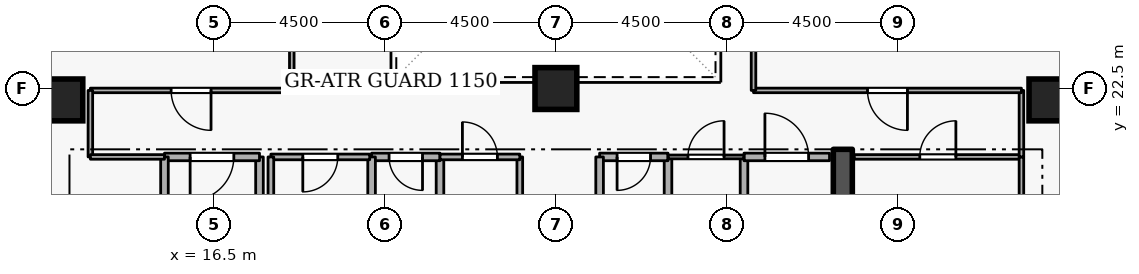
"""IFC4 building model, lengths in metres.
Left out: names, types, materials, properties, quantities, classifications, styles, units other than length and angle.
Written with IfcOpenShell. Run it as: python <this file> out.ifc"""

import sys

from ifc_helpers import new_model, si_unit, direction, frame, frame_2d, origin, origin_2d, place, context, subcontext, project, spatial, rectangle, extrude, element, fill, save


model = new_model("IFC4")
c1 = context("Model", 3, precision=1e-05, world=origin(), true_north=direction((0.0, 1.0)))
c2 = subcontext(c1, "Body", "Model", "MODEL_VIEW")
j1 = project(units=[si_unit("LENGTHUNIT", "METRE"), si_unit("PLANEANGLEUNIT", "RADIAN")], contexts=[c1])
p1 = place(None, origin())
s1 = spatial("IfcSite", under=j1, at=p1, CompositionType="ELEMENT")
p2 = place(p1, origin())
s2 = spatial("IfcBuilding", under=s1, at=p2, CompositionType="ELEMENT")
p3 = place(p2, frame((0.0, 0.0, 149.1)))
s3 = spatial("IfcBuildingStorey", under=s2, at=p3, CompositionType="ELEMENT", Elevation=149.1)
p4 = place(p3, frame((33.05, 15.1, 0.0), z_axis=(0.0, 0.0, 1.0), x_axis=(0.0, 1.0, 0.0)))
e1 = element("IfcWall", 1, at=p4, inside=s3, PredefinedType="SHEAR", context=c2, shape_type="SweptSolid", body=[
    extrude(rectangle(XDim=5.8, YDim=0.5, at=frame_2d((2.9, 0.0))), origin(), (0.0, 0.0, 1.0), 3.6),
])
for number, where, z_axis, x_axis in (
    (2, (12.5, 22.2, 0.0), (0.0, 0.0, 1.0), (1.0, 0.0, 0.0)),
    (3, (38.5, 22.2, 0.0), (0.0, 0.0, 1.0), (1.0, 0.0, 0.0)),
    (4, (25.5, 22.5, 0.0), (0.0, 0.0, 1.0), (1.0, 0.0, 0.0)),
):
    element("IfcColumn", number, at=place(p3, frame(where, z_axis=z_axis, x_axis=x_axis)), inside=s3, PredefinedType="COLUMN", context=c2, shape_type="SweptSolid", body=[
        extrude(rectangle(XDim=1.1, YDim=1.1, at=origin_2d()), origin(), (0.0, 0.0, 1.0), 3.6),
    ])
p5 = place(p3, frame((17.7, 18.4, 0.0), z_axis=(0.0, 0.0, 1.0), x_axis=(0.0, 1.0, 0.0)))
e5 = element("IfcWall", 5, at=p5, inside=s3, PredefinedType="STANDARD", context=c2, shape_type="SweptSolid", body=[
    extrude(rectangle(XDim=2.3, YDim=0.2, at=frame_2d((1.15, 0.0))), origin(), (0.0, 0.0, 1.0), 2.505),
])
p6 = place(p3, frame((17.7, 20.7, 0.0), z_axis=(0.0, 0.0, 1.0), x_axis=(-1.0, 0.0, 0.0)))
e6 = element("IfcWall", 6, at=p6, inside=s3, PredefinedType="STANDARD", context=c2, shape_type="SweptSolid", body=[
    extrude(rectangle(XDim=2.5, YDim=0.2, at=frame_2d((1.25, 0.0))), origin(), (0.0, 0.0, 1.0), 3.3),
])
p7 = place(p6, frame((0.675, 0.0, 0.0)))
e7 = element("IfcOpeningElement", 7, at=p7, cuts=e6, PredefinedType="OPENING", context=c2, shape_type="SweptSolid", body=[
    extrude(rectangle(XDim=1.15, YDim=2.1, at=frame_2d((0.575, 1.05))), frame((0.0, 0.11, 0.0), z_axis=(0.0, -1.0, 0.0), x_axis=(1.0, 0.0, 0.0)), (0.0, 0.0, 1.0), 0.22),
])
p8 = place(p3, frame((15.2, 20.7, 0.0), z_axis=(0.0, 0.0, 1.0), x_axis=(0.0, -1.0, 0.0)))
e8 = element("IfcWall", 8, at=p8, inside=s3, PredefinedType="STANDARD", context=c2, shape_type="SweptSolid", body=[
    extrude(rectangle(XDim=5.7, YDim=0.2, at=frame_2d((2.85, 0.0))), origin(), (0.0, 0.0, 1.0), 3.3),
])
p9 = place(p3, frame((28.45, 18.65, 0.0), z_axis=(0.0, 0.0, 1.0), x_axis=(0.0, 1.0, 0.0)))
e9 = element("IfcWall", 9, at=p9, inside=s3, PredefinedType="STANDARD", context=c2, shape_type="SweptSolid", body=[
    extrude(rectangle(XDim=2.05, YDim=0.2, at=frame_2d((1.025, 0.0))), origin(), (0.0, 0.0, 1.0), 3.3),
])
p10 = place(p3, frame((28.45, 20.7, 0.0), z_axis=(0.0, 0.0, 1.0), x_axis=(-1.0, 0.0, 0.0)))
e10 = element("IfcWall", 10, at=p10, inside=s3, PredefinedType="STANDARD", context=c2, shape_type="SweptSolid", body=[
    extrude(rectangle(XDim=1.8, YDim=0.2, at=frame_2d((0.9, 0.0))), origin(), (0.0, 0.0, 1.0), 3.3),
])
p11 = place(p10, frame((0.46, 0.0, 0.0)))
e11 = element("IfcOpeningElement", 11, at=p11, cuts=e10, PredefinedType="OPENING", context=c2, shape_type="SweptSolid", body=[
    extrude(rectangle(XDim=0.88, YDim=2.04, at=frame_2d((0.44, 1.02))), frame((0.0, 0.11, 0.0), z_axis=(0.0, -1.0, 0.0), x_axis=(1.0, 0.0, 0.0)), (0.0, 0.0, 1.0), 0.22),
])
for number, where, z_axis, x_axis in (
    (12, (26.65, 20.7, 0.0), (0.0, 0.0, 1.0), (0.0, -1.0, 0.0)),
    (13, (22.45, 18.65, 0.0), (0.0, 0.0, 1.0), (0.0, 1.0, 0.0)),
):
    element("IfcWall", number, at=place(p3, frame(where, z_axis=z_axis, x_axis=x_axis)), inside=s3, PredefinedType="STANDARD", context=c2, shape_type="SweptSolid", body=[
        extrude(rectangle(XDim=2.05, YDim=0.2, at=frame_2d((1.025, 0.0))), origin(), (0.0, 0.0, 1.0), 3.3),
    ])
p12 = place(p3, frame((22.45, 20.7, 0.0), z_axis=(0.0, 0.0, 1.0), x_axis=(-1.0, 0.0, 0.0)))
e14 = element("IfcWall", 14, at=p12, inside=s3, PredefinedType="STANDARD", context=c2, shape_type="SweptSolid", body=[
    extrude(rectangle(XDim=1.8, YDim=0.2, at=frame_2d((0.9, 0.0))), origin(), (0.0, 0.0, 1.0), 3.3),
])
p13 = place(p12, frame((0.46, 0.0, 0.0)))
e15 = element("IfcOpeningElement", 15, at=p13, cuts=e14, PredefinedType="OPENING", context=c2, shape_type="SweptSolid", body=[
    extrude(rectangle(XDim=0.88, YDim=2.04, at=frame_2d((0.44, 1.02))), frame((0.0, 0.11, 0.0), z_axis=(0.0, -1.0, 0.0), x_axis=(1.0, 0.0, 0.0)), (0.0, 0.0, 1.0), 0.22),
])
for number, where, z_axis, x_axis in (
    (16, (20.65, 20.7, 0.0), (0.0, 0.0, 1.0), (0.0, -1.0, 0.0)),
    (17, (30.45, 18.65, 0.0), (0.0, 0.0, 1.0), (0.0, 1.0, 0.0)),
):
    element("IfcWall", number, at=place(p3, frame(where, z_axis=z_axis, x_axis=x_axis)), inside=s3, PredefinedType="STANDARD", context=c2, shape_type="SweptSolid", body=[
        extrude(rectangle(XDim=2.05, YDim=0.2, at=frame_2d((1.025, 0.0))), origin(), (0.0, 0.0, 1.0), 3.3),
    ])
p14 = place(p3, frame((30.45, 20.7, 0.0), z_axis=(0.0, 0.0, 1.0), x_axis=(1.0, 0.0, 0.0)))
e18 = element("IfcWall", 18, at=p14, inside=s3, PredefinedType="STANDARD", context=c2, shape_type="SweptSolid", body=[
    extrude(rectangle(XDim=2.25, YDim=0.2, at=frame_2d((1.125, 0.0))), origin(), (0.0, 0.0, 1.0), 3.3),
])
p15 = place(p14, frame((0.55, 0.0, 0.0)))
e19 = element("IfcOpeningElement", 19, at=p15, cuts=e18, PredefinedType="OPENING", context=c2, shape_type="SweptSolid", body=[
    extrude(rectangle(XDim=1.15, YDim=2.1, at=frame_2d((0.575, 1.05))), frame((0.0, 0.11, 0.0), z_axis=(0.0, -1.0, 0.0), x_axis=(1.0, 0.0, 0.0)), (0.0, 0.0, 1.0), 0.22),
])
p16 = place(p3, frame((20.6, 20.7, 0.0), z_axis=(0.0, 0.0, 1.0), x_axis=(-1.0, 0.0, 0.0)))
e20 = element("IfcWall", 20, at=p16, inside=s3, PredefinedType="PARTITIONING", context=c2, shape_type="SweptSolid", body=[
    extrude(rectangle(XDim=2.6, YDim=0.15, at=frame_2d((1.3, 0.0))), origin(), (0.0, 0.0, 1.0), 3.3),
])
p17 = place(p16, frame((0.84, 0.0, 0.0)))
e21 = element("IfcOpeningElement", 21, at=p17, cuts=e20, PredefinedType="OPENING", context=c2, shape_type="SweptSolid", body=[
    extrude(rectangle(XDim=0.92, YDim=2.08, at=frame_2d((0.46, 1.04))), frame((0.0, 0.085, 0.0), z_axis=(0.0, -1.0, 0.0), x_axis=(1.0, 0.0, 0.0)), (0.0, 0.0, 1.0), 0.17),
])
p18 = place(p3, frame((18.0, 20.7, 0.0), z_axis=(0.0, 0.0, 1.0), x_axis=(0.0, -1.0, 0.0)))
e22 = element("IfcWall", 22, at=p18, inside=s3, PredefinedType="PARTITIONING", context=c2, shape_type="SweptSolid", body=[
    extrude(rectangle(XDim=2.05, YDim=0.15, at=frame_2d((1.025, 0.0))), origin(), (0.0, 0.0, 1.0), 2.505),
])
p19 = place(p3, frame((24.55, 20.7, 0.0), z_axis=(0.0, 0.0, 1.0), x_axis=(0.0, -1.0, 0.0)))
e23 = element("IfcWall", 23, at=p19, inside=s3, PredefinedType="PARTITIONING", context=c2, shape_type="SweptSolid", body=[
    extrude(rectangle(XDim=2.05, YDim=0.15, at=frame_2d((1.025, 0.0))), origin(), (0.0, 0.0, 1.0), 3.3),
])
p20 = place(p3, frame((22.45, 20.7, 0.0), z_axis=(0.0, 0.0, 1.0), x_axis=(1.0, 0.0, 0.0)))
e24 = element("IfcWall", 24, at=p20, inside=s3, PredefinedType="PARTITIONING", context=c2, shape_type="SweptSolid", body=[
    extrude(rectangle(XDim=2.1, YDim=0.15, at=frame_2d((1.05, 0.0))), origin(), (0.0, 0.0, 1.0), 3.3),
])
p21 = place(p20, frame((0.59, 0.0, 0.0)))
e25 = element("IfcOpeningElement", 25, at=p21, cuts=e24, PredefinedType="OPENING", context=c2, shape_type="SweptSolid", body=[
    extrude(rectangle(XDim=0.92, YDim=2.08, at=frame_2d((0.46, 1.04))), frame((0.0, 0.085, 0.0), z_axis=(0.0, -1.0, 0.0), x_axis=(1.0, 0.0, 0.0)), (0.0, 0.0, 1.0), 0.17),
])
p22 = place(p3, frame((28.45, 20.7, 0.0), z_axis=(0.0, 0.0, 1.0), x_axis=(1.0, 0.0, 0.0)))
e26 = element("IfcWall", 26, at=p22, inside=s3, PredefinedType="PARTITIONING", context=c2, shape_type="SweptSolid", body=[
    extrude(rectangle(XDim=2.0, YDim=0.1, at=frame_2d((1.0, 0.0))), origin(), (0.0, 0.0, 1.0), 3.3),
])
p23 = place(p22, frame((0.525, 0.0, 0.0)))
e27 = element("IfcOpeningElement", 27, at=p23, cuts=e26, PredefinedType="OPENING", context=c2, shape_type="SweptSolid", body=[
    extrude(rectangle(XDim=0.95, YDim=2.1, at=frame_2d((0.475, 1.05))), frame((0.0, 0.06, 0.0), z_axis=(0.0, -1.0, 0.0), x_axis=(1.0, 0.0, 0.0)), (0.0, 0.0, 1.0), 0.12),
])
p24 = place(p3, frame((33.35, 20.7, 0.0), z_axis=(0.0, 0.0, 1.0), x_axis=(1.0, 0.0, 0.0)))
e28 = element("IfcWall", 28, at=p24, inside=s3, PredefinedType="PARTITIONING", context=c2, shape_type="SweptSolid", body=[
    extrude(rectangle(XDim=4.4, YDim=0.12, at=frame_2d((2.2, 0.0))), origin(), (0.0, 0.0, 1.0), 3.3),
])
p25 = place(p24, frame((1.725, 0.0, 0.0)))
e29 = element("IfcOpeningElement", 29, at=p25, cuts=e28, PredefinedType="OPENING", context=c2, shape_type="SweptSolid", body=[
    extrude(rectangle(XDim=0.95, YDim=2.1, at=frame_2d((0.475, 1.05))), frame((0.0, 0.07, 0.0), z_axis=(0.0, -1.0, 0.0), x_axis=(1.0, 0.0, 0.0)), (0.0, 0.0, 1.0), 0.14),
])
p26 = place(p3, frame((37.75, 20.7, 0.0), z_axis=(0.0, 0.0, 1.0), x_axis=(0.0, -1.0, 0.0)))
e30 = element("IfcWall", 30, at=p26, inside=s3, PredefinedType="PARTITIONING", context=c2, shape_type="SweptSolid", body=[
    extrude(rectangle(XDim=5.65, YDim=0.12, at=frame_2d((2.825, 0.0))), origin(), (0.0, 0.0, 1.0), 3.3),
])
p27 = place(p3, frame((18.55, 27.0, 0.0), z_axis=(0.0, 0.0, 1.0), x_axis=(0.0, -1.0, 0.0)))
e31 = element("IfcWall", 31, at=p27, inside=s3, PredefinedType="PARTITIONING", context=c2, shape_type="SweptSolid", body=[
    extrude(rectangle(XDim=4.55, YDim=0.12, at=frame_2d((2.275, 0.0))), origin(), (0.0, 0.0, 1.0), 3.3),
])
p28 = place(p3, frame((18.55, 22.45, 0.0), z_axis=(0.0, 0.0, 1.0), x_axis=(-1.0, 0.0, 0.0)))
e32 = element("IfcWall", 32, at=p28, inside=s3, PredefinedType="PARTITIONING", context=c2, shape_type="SweptSolid", body=[
    extrude(rectangle(XDim=5.3, YDim=0.12, at=frame_2d((2.65, 0.0))), origin(), (0.0, 0.0, 1.0), 3.3),
])
p29 = place(p28, frame((2.125, 0.0, 0.0)))
e33 = element("IfcOpeningElement", 33, at=p29, cuts=e32, PredefinedType="OPENING", context=c2, shape_type="SweptSolid", body=[
    extrude(rectangle(XDim=1.05, YDim=2.1, at=frame_2d((0.525, 1.05))), frame((0.0, 0.07, 0.0), z_axis=(0.0, -1.0, 0.0), x_axis=(1.0, 0.0, 0.0)), (0.0, 0.0, 1.0), 0.14),
])
p30 = place(p3, frame((13.25, 22.45, 0.0), z_axis=(0.0, 0.0, 1.0), x_axis=(0.0, -1.0, 0.0)))
e34 = element("IfcWall", 34, at=p30, inside=s3, PredefinedType="PARTITIONING", context=c2, shape_type="SweptSolid", body=[
    extrude(rectangle(XDim=1.75, YDim=0.12, at=frame_2d((0.875, 0.0))), origin(), (0.0, 0.0, 1.0), 3.3),
])
p31 = place(p3, frame((13.25, 20.7, 0.0), z_axis=(0.0, 0.0, 1.0), x_axis=(1.0, 0.0, 0.0)))
e35 = element("IfcWall", 35, at=p31, inside=s3, PredefinedType="PARTITIONING", context=c2, shape_type="SweptSolid", body=[
    extrude(rectangle(XDim=1.95, YDim=0.12, at=frame_2d((0.975, 0.0))), origin(), (0.0, 0.0, 1.0), 3.3),
])
p32 = place(p3, frame((37.75, 20.7, 0.0), z_axis=(0.0, 0.0, 1.0), x_axis=(0.0, 1.0, 0.0)))
e36 = element("IfcWall", 36, at=p32, inside=s3, PredefinedType="PARTITIONING", context=c2, shape_type="SweptSolid", body=[
    extrude(rectangle(XDim=1.75, YDim=0.12, at=frame_2d((0.875, 0.0))), origin(), (0.0, 0.0, 1.0), 3.3),
])
p33 = place(p3, frame((37.75, 22.45, 0.0), z_axis=(0.0, 0.0, 1.0), x_axis=(-1.0, 0.0, 0.0)))
e37 = element("IfcWall", 37, at=p33, inside=s3, PredefinedType="PARTITIONING", context=c2, shape_type="SweptSolid", body=[
    extrude(rectangle(XDim=7.05, YDim=0.12, at=frame_2d((3.525, 0.0))), origin(), (0.0, 0.0, 1.0), 3.3),
])
p34 = place(p33, frame((3.0, 0.0, 0.0)))
e38 = element("IfcOpeningElement", 38, at=p34, cuts=e37, PredefinedType="OPENING", context=c2, shape_type="SweptSolid", body=[
    extrude(rectangle(XDim=1.05, YDim=2.1, at=frame_2d((0.525, 1.05))), frame((0.0, 0.07, 0.0), z_axis=(0.0, -1.0, 0.0), x_axis=(1.0, 0.0, 0.0)), (0.0, 0.0, 1.0), 0.14),
])
p35 = place(p3, frame((30.7, 22.45, 0.0), z_axis=(0.0, 0.0, 1.0), x_axis=(0.0, 1.0, 0.0)))
e39 = element("IfcWall", 39, at=p35, inside=s3, PredefinedType="PARTITIONING", context=c2, shape_type="SweptSolid", body=[
    extrude(rectangle(XDim=4.55, YDim=0.12, at=frame_2d((2.275, 0.0))), origin(), (0.0, 0.0, 1.0), 3.3),
])
p36 = place(p7, origin())
e40 = element("IfcDoor", 40, at=p36, inside=s3, OperationType="SINGLE_SWING_RIGHT", PredefinedType="DOOR", context=c2, shape_type="SweptSolid", body=[
    extrude(rectangle(XDim=1.15, YDim=2.1, at=frame_2d((0.575, 1.05))), frame((0.0, 0.025, 0.0), z_axis=(0.0, -1.0, 0.0), x_axis=(1.0, 0.0, 0.0)), (0.0, 0.0, 1.0), 0.05),
])
fill(e7, e40)
p37 = place(p11, origin())
e41 = element("IfcDoor", 41, at=p37, inside=s3, OperationType="SINGLE_SWING_RIGHT", PredefinedType="DOOR", context=c2, shape_type="SweptSolid", body=[
    extrude(rectangle(XDim=0.88, YDim=2.04, at=frame_2d((0.44, 1.02))), frame((0.0, 0.025, 0.0), z_axis=(0.0, -1.0, 0.0), x_axis=(1.0, 0.0, 0.0)), (0.0, 0.0, 1.0), 0.05),
])
fill(e11, e41)
p38 = place(p13, origin())
e42 = element("IfcDoor", 42, at=p38, inside=s3, OperationType="SINGLE_SWING_LEFT", PredefinedType="DOOR", context=c2, shape_type="SweptSolid", body=[
    extrude(rectangle(XDim=0.88, YDim=2.04, at=frame_2d((0.44, 1.02))), frame((0.0, 0.025, 0.0), z_axis=(0.0, -1.0, 0.0), x_axis=(1.0, 0.0, 0.0)), (0.0, 0.0, 1.0), 0.05),
])
fill(e15, e42)
p39 = place(p17, origin())
e43 = element("IfcDoor", 43, at=p39, inside=s3, OperationType="SINGLE_SWING_RIGHT", PredefinedType="DOOR", context=c2, shape_type="SweptSolid", body=[
    extrude(rectangle(XDim=0.92, YDim=2.08, at=frame_2d((0.46, 1.04))), frame((0.0, 0.025, 0.0), z_axis=(0.0, -1.0, 0.0), x_axis=(1.0, 0.0, 0.0)), (0.0, 0.0, 1.0), 0.05),
])
fill(e21, e43)
p40 = place(p21, origin())
e44 = element("IfcDoor", 44, at=p40, inside=s3, OperationType="SINGLE_SWING_LEFT", PredefinedType="DOOR", context=c2, shape_type="SweptSolid", body=[
    extrude(rectangle(XDim=0.92, YDim=2.08, at=frame_2d((0.46, 1.04))), frame((0.0, 0.025, 0.0), z_axis=(0.0, -1.0, 0.0), x_axis=(1.0, 0.0, 0.0)), (0.0, 0.0, 1.0), 0.05),
])
fill(e25, e44)
p41 = place(p23, origin())
e45 = element("IfcDoor", 45, at=p41, inside=s3, OperationType="SINGLE_SWING_RIGHT", PredefinedType="DOOR", context=c2, shape_type="SweptSolid", body=[
    extrude(rectangle(XDim=0.95, YDim=2.1, at=frame_2d((0.475, 1.05))), frame((0.0, 0.025, 0.0), z_axis=(0.0, -1.0, 0.0), x_axis=(1.0, 0.0, 0.0)), (0.0, 0.0, 1.0), 0.05),
])
fill(e27, e45)
p42 = place(p15, origin())
e46 = element("IfcDoor", 46, at=p42, inside=s3, OperationType="SINGLE_SWING_LEFT", PredefinedType="DOOR", context=c2, shape_type="SweptSolid", body=[
    extrude(rectangle(XDim=1.15, YDim=2.1, at=frame_2d((0.575, 1.05))), frame((0.0, 0.025, 0.0), z_axis=(0.0, -1.0, 0.0), x_axis=(1.0, 0.0, 0.0)), (0.0, 0.0, 1.0), 0.05),
])
fill(e19, e46)
p43 = place(p25, origin())
e47 = element("IfcDoor", 47, at=p43, inside=s3, OperationType="SINGLE_SWING_RIGHT", PredefinedType="DOOR", context=c2, shape_type="SweptSolid", body=[
    extrude(rectangle(XDim=0.95, YDim=2.1, at=frame_2d((0.475, 1.05))), frame((0.0, 0.025, 0.0), z_axis=(0.0, -1.0, 0.0), x_axis=(1.0, 0.0, 0.0)), (0.0, 0.0, 1.0), 0.05),
])
fill(e29, e47)
p44 = place(p29, origin())
e48 = element("IfcDoor", 48, at=p44, inside=s3, OperationType="SINGLE_SWING_LEFT", PredefinedType="DOOR", context=c2, shape_type="SweptSolid", body=[
    extrude(rectangle(XDim=1.05, YDim=2.1, at=frame_2d((0.525, 1.05))), frame((0.0, 0.025, 0.0), z_axis=(0.0, -1.0, 0.0), x_axis=(1.0, 0.0, 0.0)), (0.0, 0.0, 1.0), 0.05),
])
fill(e33, e48)
p45 = place(p34, origin())
e49 = element("IfcDoor", 49, at=p45, inside=s3, OperationType="SINGLE_SWING_LEFT", PredefinedType="DOOR", context=c2, shape_type="SweptSolid", body=[
    extrude(rectangle(XDim=1.05, YDim=2.1, at=frame_2d((0.525, 1.05))), frame((0.0, 0.025, 0.0), z_axis=(0.0, -1.0, 0.0), x_axis=(1.0, 0.0, 0.0)), (0.0, 0.0, 1.0), 0.05),
])
fill(e38, e49)
save(model, sys.argv[1])
